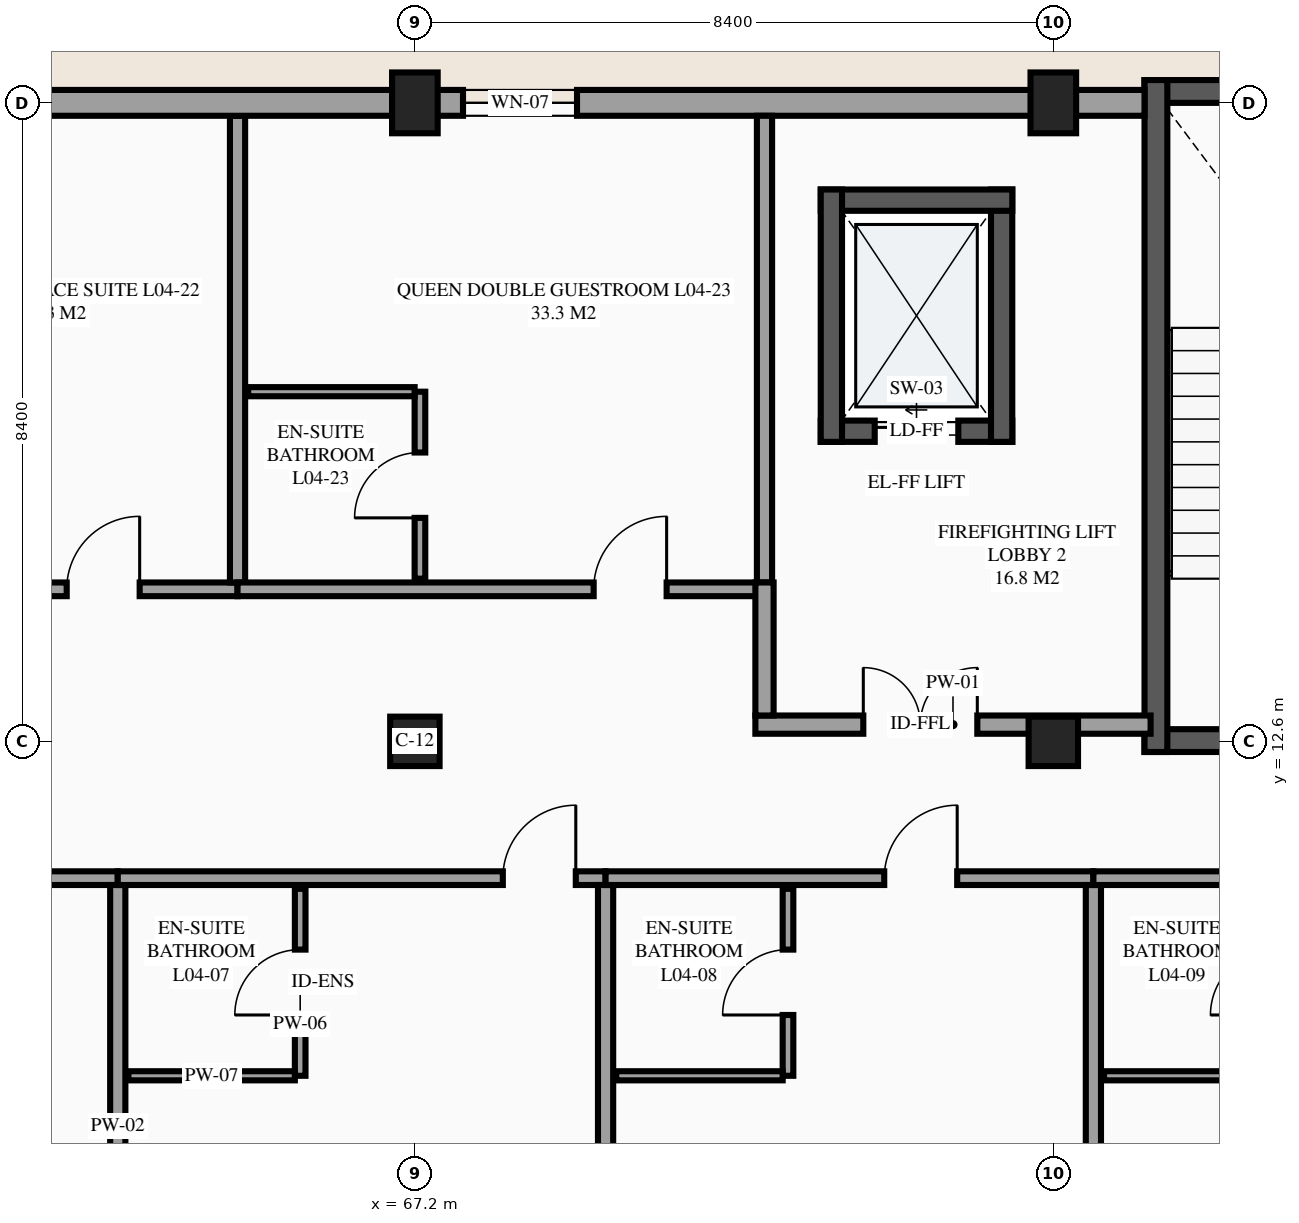
"""IFC4 building model, lengths in metres.
Left out: names, types, materials, properties, quantities, classifications, styles, units other than length and angle.
Written with IfcOpenShell. Run it as: python <this file> out.ifc"""

import sys

from ifc_helpers import new_model, si_unit, direction, frame, frame_2d, origin, origin_2d, place, context, subcontext, project, spatial, rectangle, extrude, element, fill, save


model = new_model("IFC4")
c1 = context("Model", 3, precision=1e-05, world=origin(), true_north=direction((0.0, 1.0)))
c2 = subcontext(c1, "Body", "Model", "MODEL_VIEW")
j1 = project(units=[si_unit("LENGTHUNIT", "METRE"), si_unit("PLANEANGLEUNIT", "RADIAN")], contexts=[c1])
p1 = place(None, origin())
s1 = spatial("IfcSite", under=j1, at=p1, CompositionType="ELEMENT")
p2 = place(p1, origin())
s2 = spatial("IfcBuilding", under=s1, at=p2, CompositionType="ELEMENT")
p3 = place(p2, frame((0.0, 0.0, 18.3)))
s3 = spatial("IfcBuildingStorey", under=s2, at=p3, CompositionType="ELEMENT", Elevation=18.3)
p4 = place(p3, frame((67.2, 12.6, 0.0), z_axis=(0.0, 0.0, 1.0), x_axis=(1.0, 0.0, 0.0)))
e1 = element("IfcColumn", 1, at=p4, inside=s3, PredefinedType="COLUMN", context=c2, shape_type="SweptSolid", body=[
    extrude(rectangle(XDim=0.65, YDim=0.65, at=origin_2d()), origin(), (0.0, 0.0, 1.0), 3.6),
])
p5 = place(p3, frame((67.2, 21.0, 0.0), z_axis=(0.0, 0.0, 1.0), x_axis=(1.0, 0.0, 0.0)))
e2 = element("IfcColumn", 2, at=p5, inside=s3, PredefinedType="COLUMN", context=c2, shape_type="SweptSolid", body=[
    extrude(rectangle(XDim=0.6, YDim=0.8, at=origin_2d()), origin(), (0.0, 0.0, 1.0), 3.6),
])
p6 = place(p3, frame((75.6, 12.6, 0.0), z_axis=(0.0, 0.0, 1.0), x_axis=(1.0, 0.0, 0.0)))
e3 = element("IfcColumn", 3, at=p6, inside=s3, PredefinedType="COLUMN", context=c2, shape_type="SweptSolid", body=[
    extrude(rectangle(XDim=0.65, YDim=0.65, at=origin_2d()), origin(), (0.0, 0.0, 1.0), 3.6),
])
p7 = place(p3, frame((75.6, 21.0, 0.0), z_axis=(0.0, 0.0, 1.0), x_axis=(1.0, 0.0, 0.0)))
e4 = element("IfcColumn", 4, at=p7, inside=s3, PredefinedType="COLUMN", context=c2, shape_type="SweptSolid", body=[
    extrude(rectangle(XDim=0.6, YDim=0.8, at=origin_2d()), origin(), (0.0, 0.0, 1.0), 3.6),
])
p8 = place(p3, frame((75.6, 21.0, 0.0), z_axis=(0.0, 0.0, 1.0), x_axis=(-1.0, 0.0, 0.0)))
e5 = element("IfcWall", 5, at=p8, inside=s3, PredefinedType="STANDARD", context=c2, shape_type="SweptSolid", body=[
    extrude(rectangle(XDim=8.4, YDim=0.34, at=frame_2d((4.2, 0.0))), origin(), (0.0, 0.0, 1.0), 3.07),
])
p9 = place(p8, frame((6.267, 0.0, 0.85)))
e6 = element("IfcOpeningElement", 6, at=p9, cuts=e5, PredefinedType="OPENING", context=c2, shape_type="SweptSolid", body=[
    extrude(rectangle(XDim=1.5, YDim=1.5, at=frame_2d((0.75, 0.75))), frame((0.0, 0.18, 0.0), z_axis=(0.0, -1.0, 0.0), x_axis=(1.0, 0.0, 0.0)), (0.0, 0.0, 1.0), 0.36),
])
p10 = place(p3, frame((72.54, 16.68, 0.0), z_axis=(0.0, 0.0, 1.0), x_axis=(1.0, 0.0, 0.0)))
e7 = element("IfcWall", 7, at=p10, inside=s3, PredefinedType="SHEAR", context=c2, shape_type="SweptSolid", body=[
    extrude(rectangle(XDim=2.52, YDim=0.28, at=frame_2d((1.26, 0.0))), origin(), (0.0, 0.0, 1.0), 3.6),
])
p11 = place(p10, frame((0.71, 0.0, 0.0)))
e8 = element("IfcOpeningElement", 8, at=p11, cuts=e7, PredefinedType="OPENING", context=c2, shape_type="SweptSolid", body=[
    extrude(rectangle(XDim=1.1, YDim=2.2, at=frame_2d((0.55, 1.1))), frame((0.0, 0.15, 0.0), z_axis=(0.0, -1.0, 0.0), x_axis=(1.0, 0.0, 0.0)), (0.0, 0.0, 1.0), 0.3),
])
p12 = place(p3, frame((74.92, 16.54, 0.0), z_axis=(0.0, 0.0, 1.0), x_axis=(0.0, 1.0, 0.0)))
e9 = element("IfcWall", 9, at=p12, inside=s3, PredefinedType="SHEAR", context=c2, shape_type="SweptSolid", body=[
    extrude(rectangle(XDim=3.32, YDim=0.28, at=frame_2d((1.66, 0.0))), origin(), (0.0, 0.0, 1.0), 3.6),
])
p13 = place(p3, frame((75.06, 19.72, 0.0), z_axis=(0.0, 0.0, 1.0), x_axis=(-1.0, 0.0, 0.0)))
e10 = element("IfcWall", 10, at=p13, inside=s3, PredefinedType="SHEAR", context=c2, shape_type="SweptSolid", body=[
    extrude(rectangle(XDim=2.52, YDim=0.28, at=frame_2d((1.26, 0.0))), origin(), (0.0, 0.0, 1.0), 3.6),
])
p14 = place(p3, frame((72.68, 19.86, 0.0), z_axis=(0.0, 0.0, 1.0), x_axis=(0.0, -1.0, 0.0)))
e11 = element("IfcWall", 11, at=p14, inside=s3, PredefinedType="SHEAR", context=c2, shape_type="SweptSolid", body=[
    extrude(rectangle(XDim=3.32, YDim=0.28, at=frame_2d((1.66, 0.0))), origin(), (0.0, 0.0, 1.0), 3.6),
])
p15 = place(p3, frame((76.8, 12.61, 0.0), z_axis=(0.0, 0.0, 1.0), x_axis=(1.0, 0.0, 0.0)))
e12 = element("IfcWall", 12, at=p15, inside=s3, PredefinedType="SHEAR", context=c2, shape_type="SweptSolid", body=[
    extrude(rectangle(XDim=5.2, YDim=0.3, at=frame_2d((2.6, 0.0))), origin(), (0.0, 0.0, 1.0), 3.6),
])
p16 = place(p15, frame((2.025, 0.0, 0.0)))
e13 = element("IfcOpeningElement", 13, at=p16, cuts=e12, PredefinedType="OPENING", context=c2, shape_type="SweptSolid", body=[
    extrude(rectangle(XDim=1.15, YDim=2.15, at=frame_2d((0.575, 1.075))), frame((0.0, 0.16, 0.0), z_axis=(0.0, -1.0, 0.0), x_axis=(1.0, 0.0, 0.0)), (0.0, 0.0, 1.0), 0.32),
])
p17 = place(p3, frame((82.0, 21.15, 0.0), z_axis=(0.0, 0.0, 1.0), x_axis=(-1.0, 0.0, 0.0)))
e14 = element("IfcWall", 14, at=p17, inside=s3, PredefinedType="SHEAR", context=c2, shape_type="SweptSolid", body=[
    extrude(rectangle(XDim=5.2, YDim=0.3, at=frame_2d((2.6, 0.0))), origin(), (0.0, 0.0, 1.0), 3.6),
])
p18 = place(p3, frame((76.95, 21.3, 0.0), z_axis=(0.0, 0.0, 1.0), x_axis=(0.0, -1.0, 0.0)))
e15 = element("IfcWall", 15, at=p18, inside=s3, PredefinedType="SHEAR", context=c2, shape_type="SweptSolid", body=[
    extrude(rectangle(XDim=8.84, YDim=0.3, at=frame_2d((4.42, 0.0))), origin(), (0.0, 0.0, 1.0), 3.6),
])
p19 = place(p3, frame((56.873, 10.8, 0.0), z_axis=(0.0, 0.0, 1.0), x_axis=(1.0, 0.0, 0.0)))
e16 = element("IfcWall", 16, at=p19, inside=s3, PredefinedType="PARTITIONING", context=c2, shape_type="SweptSolid", body=[
    extrude(rectangle(XDim=6.418, YDim=0.18, at=frame_2d((3.209, 0.0))), origin(), (0.0, 0.0, 1.0), 3.375),
])
p20 = place(p19, frame((4.366, 0.0, 0.0)))
e17 = element("IfcOpeningElement", 17, at=p20, cuts=e16, PredefinedType="OPENING", context=c2, shape_type="SweptSolid", body=[
    extrude(rectangle(XDim=0.96, YDim=2.15, at=frame_2d((0.48, 1.075))), frame((0.0, 0.1, 0.0), z_axis=(0.0, -1.0, 0.0), x_axis=(1.0, 0.0, 0.0)), (0.0, 0.0, 1.0), 0.2),
])
p21 = place(p3, frame((63.291, 4.37, 0.0), z_axis=(0.0, 0.0, 1.0), x_axis=(0.0, 1.0, 0.0)))
e18 = element("IfcWall", 18, at=p21, inside=s3, PredefinedType="PARTITIONING", context=c2, shape_type="SweptSolid", body=[
    extrude(rectangle(XDim=6.34, YDim=0.2, at=frame_2d((3.17, 0.0))), origin(), (0.0, 0.0, 1.0), 3.375),
])
p22 = place(p3, frame((63.291, 10.8, 0.0), z_axis=(0.0, 0.0, 1.0), x_axis=(1.0, 0.0, 0.0)))
e19 = element("IfcWall", 19, at=p22, inside=s3, PredefinedType="PARTITIONING", context=c2, shape_type="SweptSolid", body=[
    extrude(rectangle(XDim=6.418, YDim=0.18, at=frame_2d((3.209, 0.0))), origin(), (0.0, 0.0, 1.0), 3.375),
])
p23 = place(p22, frame((5.066, 0.0, 0.0)))
e20 = element("IfcOpeningElement", 20, at=p23, cuts=e19, PredefinedType="OPENING", context=c2, shape_type="SweptSolid", body=[
    extrude(rectangle(XDim=0.96, YDim=2.15, at=frame_2d((0.48, 1.075))), frame((0.0, 0.1, 0.0), z_axis=(0.0, -1.0, 0.0), x_axis=(1.0, 0.0, 0.0)), (0.0, 0.0, 1.0), 0.2),
])
p24 = place(p3, frame((69.709, 4.37, 0.0), z_axis=(0.0, 0.0, 1.0), x_axis=(0.0, 1.0, 0.0)))
e21 = element("IfcWall", 21, at=p24, inside=s3, PredefinedType="PARTITIONING", context=c2, shape_type="SweptSolid", body=[
    extrude(rectangle(XDim=6.34, YDim=0.2, at=frame_2d((3.17, 0.0))), origin(), (0.0, 0.0, 1.0), 3.375),
])
p25 = place(p3, frame((65.691, 8.2, 0.0), z_axis=(0.0, 0.0, 1.0), x_axis=(0.0, 1.0, 0.0)))
e22 = element("IfcWall", 22, at=p25, inside=s3, PredefinedType="PARTITIONING", context=c2, shape_type="SweptSolid", body=[
    extrude(rectangle(XDim=2.46, YDim=0.14, at=frame_2d((1.23, 0.0))), origin(), (0.0, 0.0, 1.0), 3.375),
])
p26 = place(p25, frame((0.8, 0.0, 0.0)))
e23 = element("IfcOpeningElement", 23, at=p26, cuts=e22, PredefinedType="OPENING", context=c2, shape_type="SweptSolid", body=[
    extrude(rectangle(XDim=0.86, YDim=2.1, at=frame_2d((0.43, 1.05))), frame((0.0, 0.08, 0.0), z_axis=(0.0, -1.0, 0.0), x_axis=(1.0, 0.0, 0.0)), (0.0, 0.0, 1.0), 0.16),
])
p27 = place(p3, frame((63.431, 8.2, 0.0), z_axis=(0.0, 0.0, 1.0), x_axis=(1.0, 0.0, 0.0)))
e24 = element("IfcWall", 24, at=p27, inside=s3, PredefinedType="PARTITIONING", context=c2, shape_type="SweptSolid", body=[
    extrude(rectangle(XDim=2.19, YDim=0.12, at=frame_2d((1.095, 0.0))), origin(), (0.0, 0.0, 1.0), 3.375),
])
p28 = place(p3, frame((69.709, 10.8, 0.0), z_axis=(0.0, 0.0, 1.0), x_axis=(1.0, 0.0, 0.0)))
e25 = element("IfcWall", 25, at=p28, inside=s3, PredefinedType="PARTITIONING", context=c2, shape_type="SweptSolid", body=[
    extrude(rectangle(XDim=6.418, YDim=0.18, at=frame_2d((3.209, 0.0))), origin(), (0.0, 0.0, 1.0), 3.375),
])
p29 = place(p28, frame((3.666, 0.0, 0.0)))
e26 = element("IfcOpeningElement", 26, at=p29, cuts=e25, PredefinedType="OPENING", context=c2, shape_type="SweptSolid", body=[
    extrude(rectangle(XDim=0.96, YDim=2.15, at=frame_2d((0.48, 1.075))), frame((0.0, 0.1, 0.0), z_axis=(0.0, -1.0, 0.0), x_axis=(1.0, 0.0, 0.0)), (0.0, 0.0, 1.0), 0.2),
])
p30 = place(p3, frame((76.127, 4.37, 0.0), z_axis=(0.0, 0.0, 1.0), x_axis=(0.0, 1.0, 0.0)))
e27 = element("IfcWall", 27, at=p30, inside=s3, PredefinedType="PARTITIONING", context=c2, shape_type="SweptSolid", body=[
    extrude(rectangle(XDim=6.34, YDim=0.2, at=frame_2d((3.17, 0.0))), origin(), (0.0, 0.0, 1.0), 3.375),
])
p31 = place(p3, frame((72.109, 8.2, 0.0), z_axis=(0.0, 0.0, 1.0), x_axis=(0.0, 1.0, 0.0)))
e28 = element("IfcWall", 28, at=p31, inside=s3, PredefinedType="PARTITIONING", context=c2, shape_type="SweptSolid", body=[
    extrude(rectangle(XDim=2.46, YDim=0.14, at=frame_2d((1.23, 0.0))), origin(), (0.0, 0.0, 1.0), 3.375),
])
p32 = place(p31, frame((0.8, 0.0, 0.0)))
e29 = element("IfcOpeningElement", 29, at=p32, cuts=e28, PredefinedType="OPENING", context=c2, shape_type="SweptSolid", body=[
    extrude(rectangle(XDim=0.86, YDim=2.1, at=frame_2d((0.43, 1.05))), frame((0.0, 0.08, 0.0), z_axis=(0.0, -1.0, 0.0), x_axis=(1.0, 0.0, 0.0)), (0.0, 0.0, 1.0), 0.16),
])
p33 = place(p3, frame((69.849, 8.2, 0.0), z_axis=(0.0, 0.0, 1.0), x_axis=(1.0, 0.0, 0.0)))
e30 = element("IfcWall", 30, at=p33, inside=s3, PredefinedType="PARTITIONING", context=c2, shape_type="SweptSolid", body=[
    extrude(rectangle(XDim=2.19, YDim=0.12, at=frame_2d((1.095, 0.0))), origin(), (0.0, 0.0, 1.0), 3.375),
])
p34 = place(p3, frame((76.127, 10.8, 0.0), z_axis=(0.0, 0.0, 1.0), x_axis=(1.0, 0.0, 0.0)))
e31 = element("IfcWall", 31, at=p34, inside=s3, PredefinedType="PARTITIONING", context=c2, shape_type="SweptSolid", body=[
    extrude(rectangle(XDim=6.418, YDim=0.18, at=frame_2d((3.209, 0.0))), origin(), (0.0, 0.0, 1.0), 3.375),
])
p35 = place(p34, frame((4.366, 0.0, 0.0)))
e32 = element("IfcOpeningElement", 32, at=p35, cuts=e31, PredefinedType="OPENING", context=c2, shape_type="SweptSolid", body=[
    extrude(rectangle(XDim=0.96, YDim=2.15, at=frame_2d((0.48, 1.075))), frame((0.0, 0.1, 0.0), z_axis=(0.0, -1.0, 0.0), x_axis=(1.0, 0.0, 0.0)), (0.0, 0.0, 1.0), 0.2),
])
p36 = place(p3, frame((76.267, 8.2, 0.0), z_axis=(0.0, 0.0, 1.0), x_axis=(1.0, 0.0, 0.0)))
e33 = element("IfcWall", 33, at=p36, inside=s3, PredefinedType="PARTITIONING", context=c2, shape_type="SweptSolid", body=[
    extrude(rectangle(XDim=2.19, YDim=0.12, at=frame_2d((1.095, 0.0))), origin(), (0.0, 0.0, 1.0), 3.375),
])
p37 = place(p3, frame((57.933, 14.6, 0.0), z_axis=(0.0, 0.0, 1.0), x_axis=(1.0, 0.0, 0.0)))
e34 = element("IfcWall", 34, at=p37, inside=s3, PredefinedType="PARTITIONING", context=c2, shape_type="SweptSolid", body=[
    extrude(rectangle(XDim=6.933, YDim=0.18, at=frame_2d((3.467, 0.0))), origin(), (0.0, 0.0, 1.0), 3.375),
])
p38 = place(p37, frame((4.686, 0.0, 0.0)))
e35 = element("IfcOpeningElement", 35, at=p38, cuts=e34, PredefinedType="OPENING", context=c2, shape_type="SweptSolid", body=[
    extrude(rectangle(XDim=0.96, YDim=2.15, at=frame_2d((0.48, 1.075))), frame((0.0, 0.1, 0.0), z_axis=(0.0, -1.0, 0.0), x_axis=(1.0, 0.0, 0.0)), (0.0, 0.0, 1.0), 0.2),
])
p39 = place(p3, frame((64.867, 14.69, 0.0), z_axis=(0.0, 0.0, 1.0), x_axis=(0.0, 1.0, 0.0)))
e36 = element("IfcWall", 36, at=p39, inside=s3, PredefinedType="PARTITIONING", context=c2, shape_type="SweptSolid", body=[
    extrude(rectangle(XDim=6.14, YDim=0.2, at=frame_2d((3.07, 0.0))), origin(), (0.0, 0.0, 1.0), 3.375),
])
p40 = place(p3, frame((64.867, 14.6, 0.0), z_axis=(0.0, 0.0, 1.0), x_axis=(1.0, 0.0, 0.0)))
e37 = element("IfcWall", 37, at=p40, inside=s3, PredefinedType="PARTITIONING", context=c2, shape_type="SweptSolid", body=[
    extrude(rectangle(XDim=6.933, YDim=0.18, at=frame_2d((3.467, 0.0))), origin(), (0.0, 0.0, 1.0), 3.375),
])
p41 = place(p40, frame((4.686, 0.0, 0.0)))
e38 = element("IfcOpeningElement", 38, at=p41, cuts=e37, PredefinedType="OPENING", context=c2, shape_type="SweptSolid", body=[
    extrude(rectangle(XDim=0.96, YDim=2.15, at=frame_2d((0.48, 1.075))), frame((0.0, 0.1, 0.0), z_axis=(0.0, -1.0, 0.0), x_axis=(1.0, 0.0, 0.0)), (0.0, 0.0, 1.0), 0.2),
])
p42 = place(p3, frame((71.8, 14.69, 0.0), z_axis=(0.0, 0.0, 1.0), x_axis=(0.0, 1.0, 0.0)))
e39 = element("IfcWall", 39, at=p42, inside=s3, PredefinedType="PARTITIONING", context=c2, shape_type="SweptSolid", body=[
    extrude(rectangle(XDim=6.14, YDim=0.2, at=frame_2d((3.07, 0.0))), origin(), (0.0, 0.0, 1.0), 3.375),
])
p43 = place(p3, frame((67.267, 14.74, 0.0), z_axis=(0.0, 0.0, 1.0), x_axis=(0.0, 1.0, 0.0)))
e40 = element("IfcWall", 40, at=p43, inside=s3, PredefinedType="PARTITIONING", context=c2, shape_type="SweptSolid", body=[
    extrude(rectangle(XDim=2.46, YDim=0.14, at=frame_2d((1.23, 0.0))), origin(), (0.0, 0.0, 1.0), 2.63),
])
p44 = place(p43, frame((0.8, 0.0, 0.0)))
e41 = element("IfcOpeningElement", 41, at=p44, cuts=e40, PredefinedType="OPENING", context=c2, shape_type="SweptSolid", body=[
    extrude(rectangle(XDim=0.86, YDim=2.1, at=frame_2d((0.43, 1.05))), frame((0.0, 0.08, 0.0), z_axis=(0.0, -1.0, 0.0), x_axis=(1.0, 0.0, 0.0)), (0.0, 0.0, 1.0), 0.16),
])
p45 = place(p3, frame((65.007, 17.2, 0.0), z_axis=(0.0, 0.0, 1.0), x_axis=(1.0, 0.0, 0.0)))
e42 = element("IfcWall", 42, at=p45, inside=s3, PredefinedType="PARTITIONING", context=c2, shape_type="SweptSolid", body=[
    extrude(rectangle(XDim=2.19, YDim=0.12, at=frame_2d((1.095, 0.0))), origin(), (0.0, 0.0, 1.0), 3.375),
])
p46 = place(p3, frame((71.68, 12.82, 0.0), z_axis=(0.0, 0.0, 1.0), x_axis=(1.0, 0.0, 0.0)))
e43 = element("IfcWall", 43, at=p46, inside=s3, PredefinedType="PARTITIONING", context=c2, shape_type="SweptSolid", body=[
    extrude(rectangle(XDim=5.2, YDim=0.24, at=frame_2d((2.6, 0.0))), origin(), (0.0, 0.0, 1.0), 3.375),
])
p47 = place(p46, frame((1.42, 0.0, 0.0)))
e44 = element("IfcOpeningElement", 44, at=p47, cuts=e43, PredefinedType="OPENING", context=c2, shape_type="SweptSolid", body=[
    extrude(rectangle(XDim=1.5, YDim=2.15, at=frame_2d((0.75, 1.075))), frame((0.0, 0.13, 0.0), z_axis=(0.0, -1.0, 0.0), x_axis=(1.0, 0.0, 0.0)), (0.0, 0.0, 1.0), 0.26),
])
p48 = place(p3, frame((71.8, 12.94, 0.0), z_axis=(0.0, 0.0, 1.0), x_axis=(0.0, 1.0, 0.0)))
e45 = element("IfcWall", 45, at=p48, inside=s3, PredefinedType="PARTITIONING", context=c2, shape_type="SweptSolid", body=[
    extrude(rectangle(XDim=1.75, YDim=0.24, at=frame_2d((0.875, 0.0))), origin(), (0.0, 0.0, 1.0), 3.375),
])
p49 = place(p3, frame((76.8, 21.0, 0.0), z_axis=(0.0, 0.0, 1.0), x_axis=(-1.0, 0.0, 0.0)))
e46 = element("IfcWall", 46, at=p49, inside=s3, PredefinedType="STANDARD", context=c2, shape_type="SweptSolid", body=[
    extrude(rectangle(XDim=1.2, YDim=0.34, at=frame_2d((0.6, 0.0))), origin(), (0.0, 0.0, 1.0), 2.73),
])
p50 = place(p3, frame((67.2, 21.0, 0.0), z_axis=(0.0, 0.0, 1.0), x_axis=(-1.0, 0.0, 0.0)))
e47 = element("IfcWall", 47, at=p50, inside=s3, PredefinedType="STANDARD", context=c2, shape_type="SweptSolid", body=[
    extrude(rectangle(XDim=8.4, YDim=0.34, at=frame_2d((4.2, 0.0))), origin(), (0.0, 0.0, 1.0), 2.63),
])
p51 = place(p50, frame((5.05, 0.0, 0.85)))
e48 = element("IfcOpeningElement", 48, at=p51, cuts=e47, PredefinedType="OPENING", context=c2, shape_type="SweptSolid", body=[
    extrude(rectangle(XDim=1.5, YDim=1.5, at=frame_2d((0.75, 0.75))), frame((0.0, 0.18, 0.0), z_axis=(0.0, -1.0, 0.0), x_axis=(1.0, 0.0, 0.0)), (0.0, 0.0, 1.0), 0.36),
])
p52 = place(p9, origin())
e49 = element("IfcWindow", 49, at=p52, inside=s3, PartitioningType="SINGLE_PANEL", PredefinedType="WINDOW", context=c2, shape_type="SweptSolid", body=[
    extrude(rectangle(XDim=1.5, YDim=1.5, at=frame_2d((0.75, 0.75))), frame((0.0, 0.03, 0.0), z_axis=(0.0, -1.0, 0.0), x_axis=(1.0, 0.0, 0.0)), (0.0, 0.0, 1.0), 0.06),
])
fill(e6, e49)
p53 = place(p11, origin())
e50 = element("IfcDoor", 50, at=p53, inside=s3, OperationType="SLIDING_TO_LEFT", PredefinedType="DOOR", context=c2, shape_type="SweptSolid", body=[
    extrude(rectangle(XDim=1.1, YDim=2.2, at=frame_2d((0.55, 1.1))), frame((0.0, 0.025, 0.0), z_axis=(0.0, -1.0, 0.0), x_axis=(1.0, 0.0, 0.0)), (0.0, 0.0, 1.0), 0.05),
])
fill(e8, e50)
p54 = place(p23, origin())
e51 = element("IfcDoor", 51, at=p54, inside=s3, OperationType="SINGLE_SWING_RIGHT", PredefinedType="DOOR", context=c2, shape_type="SweptSolid", body=[
    extrude(rectangle(XDim=0.96, YDim=2.15, at=frame_2d((0.48, 1.075))), frame((0.0, 0.025, 0.0), z_axis=(0.0, -1.0, 0.0), x_axis=(1.0, 0.0, 0.0)), (0.0, 0.0, 1.0), 0.05),
])
fill(e20, e51)
p55 = place(p26, origin())
e52 = element("IfcDoor", 52, at=p55, inside=s3, OperationType="SINGLE_SWING_LEFT", PredefinedType="DOOR", context=c2, shape_type="SweptSolid", body=[
    extrude(rectangle(XDim=0.86, YDim=2.1, at=frame_2d((0.43, 1.05))), frame((0.0, 0.025, 0.0), z_axis=(0.0, -1.0, 0.0), x_axis=(1.0, 0.0, 0.0)), (0.0, 0.0, 1.0), 0.05),
])
fill(e23, e52)
p56 = place(p29, origin())
e53 = element("IfcDoor", 53, at=p56, inside=s3, OperationType="SINGLE_SWING_RIGHT", PredefinedType="DOOR", context=c2, shape_type="SweptSolid", body=[
    extrude(rectangle(XDim=0.96, YDim=2.15, at=frame_2d((0.48, 1.075))), frame((0.0, 0.025, 0.0), z_axis=(0.0, -1.0, 0.0), x_axis=(1.0, 0.0, 0.0)), (0.0, 0.0, 1.0), 0.05),
])
fill(e26, e53)
p57 = place(p32, origin())
e54 = element("IfcDoor", 54, at=p57, inside=s3, OperationType="SINGLE_SWING_LEFT", PredefinedType="DOOR", context=c2, shape_type="SweptSolid", body=[
    extrude(rectangle(XDim=0.86, YDim=2.1, at=frame_2d((0.43, 1.05))), frame((0.0, 0.025, 0.0), z_axis=(0.0, -1.0, 0.0), x_axis=(1.0, 0.0, 0.0)), (0.0, 0.0, 1.0), 0.05),
])
fill(e29, e54)
p58 = place(p38, origin())
e55 = element("IfcDoor", 55, at=p58, inside=s3, OperationType="SINGLE_SWING_RIGHT", PredefinedType="DOOR", context=c2, shape_type="SweptSolid", body=[
    extrude(rectangle(XDim=0.96, YDim=2.15, at=frame_2d((0.48, 1.075))), frame((0.0, 0.025, 0.0), z_axis=(0.0, -1.0, 0.0), x_axis=(1.0, 0.0, 0.0)), (0.0, 0.0, 1.0), 0.05),
])
fill(e35, e55)
p59 = place(p41, origin())
e56 = element("IfcDoor", 56, at=p59, inside=s3, OperationType="SINGLE_SWING_RIGHT", PredefinedType="DOOR", context=c2, shape_type="SweptSolid", body=[
    extrude(rectangle(XDim=0.96, YDim=2.15, at=frame_2d((0.48, 1.075))), frame((0.0, 0.025, 0.0), z_axis=(0.0, -1.0, 0.0), x_axis=(1.0, 0.0, 0.0)), (0.0, 0.0, 1.0), 0.05),
])
fill(e38, e56)
p60 = place(p44, origin())
e57 = element("IfcDoor", 57, at=p60, inside=s3, OperationType="SINGLE_SWING_LEFT", PredefinedType="DOOR", context=c2, shape_type="SweptSolid", body=[
    extrude(rectangle(XDim=0.86, YDim=2.1, at=frame_2d((0.43, 1.05))), frame((0.0, 0.025, 0.0), z_axis=(0.0, -1.0, 0.0), x_axis=(1.0, 0.0, 0.0)), (0.0, 0.0, 1.0), 0.05),
])
fill(e41, e57)
p61 = place(p47, origin())
e58 = element("IfcDoor", 58, at=p61, inside=s3, OperationType="DOUBLE_DOOR_SINGLE_SWING", PredefinedType="DOOR", context=c2, shape_type="SweptSolid", body=[
    extrude(rectangle(XDim=1.5, YDim=2.15, at=frame_2d((0.75, 1.075))), frame((0.0, 0.025, 0.0), z_axis=(0.0, -1.0, 0.0), x_axis=(1.0, 0.0, 0.0)), (0.0, 0.0, 1.0), 0.05),
])
fill(e44, e58)
save(model, sys.argv[1])
